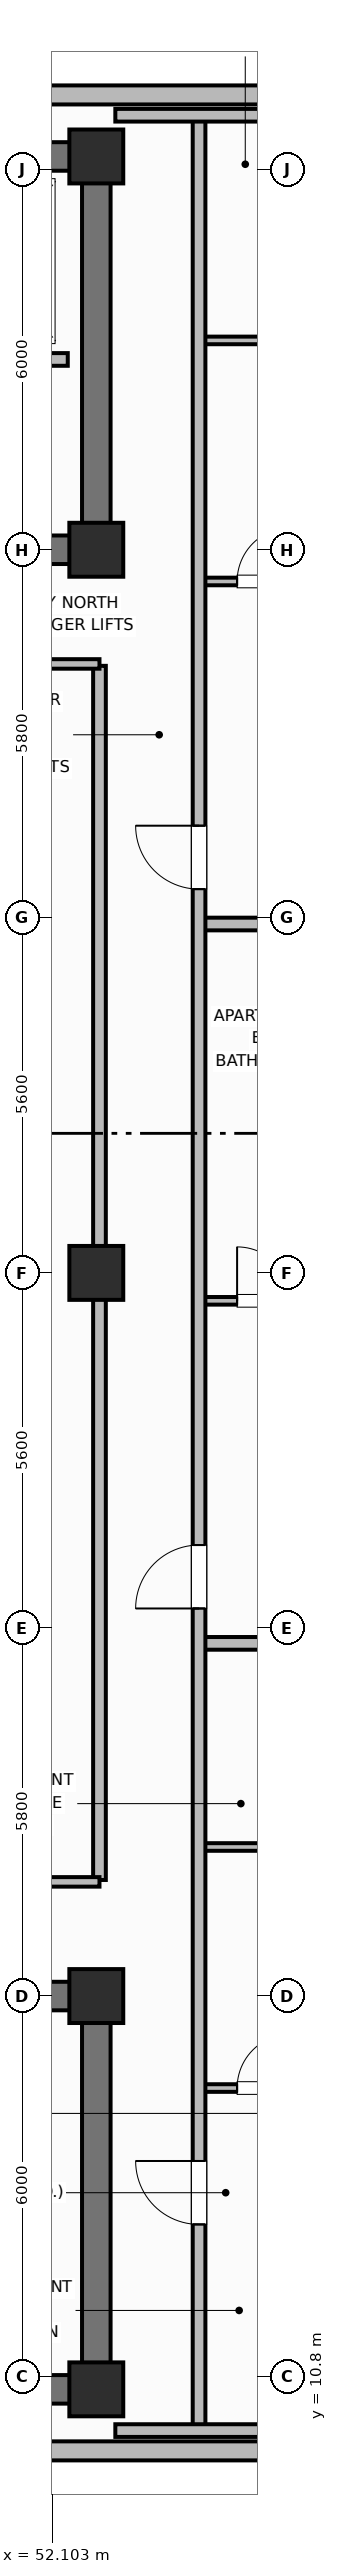
"""IFC4 building model, lengths in metres.
Left out: names, types, materials, properties, quantities, classifications, styles, units other than length and angle.
Written with IfcOpenShell. Run it as: python <this file> out.ifc"""

import sys

from ifc_helpers import new_model, si_unit, direction, frame, frame_2d, origin, origin_2d, place, context, subcontext, project, spatial, rectangle, extrude, element, fill, save


model = new_model("IFC4")
c1 = context("Model", 3, precision=1e-05, world=origin(), true_north=direction((0.0, 1.0)))
c2 = subcontext(c1, "Body", "Model", "MODEL_VIEW")
j1 = project(units=[si_unit("LENGTHUNIT", "METRE"), si_unit("PLANEANGLEUNIT", "RADIAN")], contexts=[c1])
p1 = place(None, origin())
s1 = spatial("IfcSite", under=j1, at=p1, CompositionType="ELEMENT")
p2 = place(p1, origin())
s2 = spatial("IfcBuilding", under=s1, at=p2, CompositionType="ELEMENT")
p3 = place(p2, frame((0.0, 0.0, 233.2)))
s3 = spatial("IfcBuildingStorey", under=s2, at=p3, CompositionType="ELEMENT", Elevation=233.2)
p4 = place(p3, frame((52.8, 10.6, 0.0), z_axis=(0.0, 0.0, 1.0), x_axis=(-1.0, 0.0, 0.0)))
e1 = element("IfcWall", 1, at=p4, inside=s3, PredefinedType="SHEAR", context=c2, shape_type="SweptSolid", body=[
    extrude(rectangle(XDim=27.2, YDim=0.45, at=frame_2d((13.6, 0.0))), origin(), (0.0, 0.0, 1.0), 3.7),
])
p5 = place(p3, frame((52.8, 10.825, 0.0), z_axis=(0.0, 0.0, 1.0), x_axis=(0.0, 1.0, 0.0)))
e2 = element("IfcWall", 2, at=p5, inside=s3, PredefinedType="SHEAR", context=c2, shape_type="SweptSolid", body=[
    extrude(rectangle(XDim=5.75, YDim=0.45, at=frame_2d((2.875, 0.0))), origin(), (0.0, 0.0, 1.0), 3.7),
])
p6 = place(p3, frame((25.6, 16.8, 0.0), z_axis=(0.0, 0.0, 1.0), x_axis=(1.0, 0.0, 0.0)))
e3 = element("IfcWall", 3, at=p6, inside=s3, PredefinedType="SHEAR", context=c2, shape_type="SweptSolid", body=[
    extrude(rectangle(XDim=27.2, YDim=0.45, at=frame_2d((13.6, 0.0))), origin(), (0.0, 0.0, 1.0), 3.7),
])
p7 = place(p6, frame((1.9, 0.0, 0.0)))
e4 = element("IfcOpeningElement", 4, at=p7, cuts=e3, PredefinedType="OPENING", context=c2, shape_type="SweptSolid", body=[
    extrude(rectangle(XDim=1.1, YDim=2.15, at=frame_2d((0.55, 1.075))), frame((0.0, 0.235, 0.0), z_axis=(0.0, -1.0, 0.0), x_axis=(1.0, 0.0, 0.0)), (0.0, 0.0, 1.0), 0.47),
])
p8 = place(p6, frame((13.0, 0.0, 0.0)))
e5 = element("IfcOpeningElement", 5, at=p8, cuts=e3, PredefinedType="OPENING", context=c2, shape_type="SweptSolid", body=[
    extrude(rectangle(XDim=1.2, YDim=2.15, at=frame_2d((0.6, 1.075))), frame((0.0, 0.235, 0.0), z_axis=(0.0, -1.0, 0.0), x_axis=(1.0, 0.0, 0.0)), (0.0, 0.0, 1.0), 0.47),
])
p9 = place(p6, frame((21.6, 0.0, 0.0)))
e6 = element("IfcOpeningElement", 6, at=p9, cuts=e3, PredefinedType="OPENING", context=c2, shape_type="SweptSolid", body=[
    extrude(rectangle(XDim=1.0, YDim=2.15, at=frame_2d((0.5, 1.075))), frame((0.0, 0.235, 0.0), z_axis=(0.0, -1.0, 0.0), x_axis=(1.0, 0.0, 0.0)), (0.0, 0.0, 1.0), 0.47),
])
p10 = place(p3, frame((25.6, 45.8, 0.0), z_axis=(0.0, 0.0, 1.0), x_axis=(1.0, 0.0, 0.0)))
e7 = element("IfcWall", 7, at=p10, inside=s3, PredefinedType="SHEAR", context=c2, shape_type="SweptSolid", body=[
    extrude(rectangle(XDim=27.2, YDim=0.45, at=frame_2d((13.6, 0.0))), origin(), (0.0, 0.0, 1.0), 3.7),
])
p11 = place(p3, frame((52.8, 39.825, 0.0), z_axis=(0.0, 0.0, 1.0), x_axis=(0.0, 1.0, 0.0)))
e8 = element("IfcWall", 8, at=p11, inside=s3, PredefinedType="SHEAR", context=c2, shape_type="SweptSolid", body=[
    extrude(rectangle(XDim=5.75, YDim=0.45, at=frame_2d((2.875, 0.0))), origin(), (0.0, 0.0, 1.0), 3.7),
])
p12 = place(p3, frame((52.8, 39.6, 0.0), z_axis=(0.0, 0.0, 1.0), x_axis=(-1.0, 0.0, 0.0)))
e9 = element("IfcWall", 9, at=p12, inside=s3, PredefinedType="SHEAR", context=c2, shape_type="SweptSolid", body=[
    extrude(rectangle(XDim=27.2, YDim=0.45, at=frame_2d((13.6, 0.0))), origin(), (0.0, 0.0, 1.0), 3.7),
])
p13 = place(p12, frame((24.2, 0.0, 0.0)))
e10 = element("IfcOpeningElement", 10, at=p13, cuts=e9, PredefinedType="OPENING", context=c2, shape_type="SweptSolid", body=[
    extrude(rectangle(XDim=1.1, YDim=2.15, at=frame_2d((0.55, 1.075))), frame((0.0, 0.235, 0.0), z_axis=(0.0, -1.0, 0.0), x_axis=(1.0, 0.0, 0.0)), (0.0, 0.0, 1.0), 0.47),
])
p14 = place(p12, frame((15.1, 0.0, 0.0)))
e11 = element("IfcOpeningElement", 11, at=p14, cuts=e9, PredefinedType="OPENING", context=c2, shape_type="SweptSolid", body=[
    extrude(rectangle(XDim=1.2, YDim=2.15, at=frame_2d((0.6, 1.075))), frame((0.0, 0.235, 0.0), z_axis=(0.0, -1.0, 0.0), x_axis=(1.0, 0.0, 0.0)), (0.0, 0.0, 1.0), 0.47),
])
p15 = place(p12, frame((11.6, 0.0, 0.0)))
e12 = element("IfcOpeningElement", 12, at=p15, cuts=e9, PredefinedType="OPENING", context=c2, shape_type="SweptSolid", body=[
    extrude(rectangle(XDim=0.9, YDim=2.1, at=frame_2d((0.45, 1.05))), frame((0.0, 0.235, 0.0), z_axis=(0.0, -1.0, 0.0), x_axis=(1.0, 0.0, 0.0)), (0.0, 0.0, 1.0), 0.47),
])
p16 = place(p12, frame((7.35, 0.0, 0.0)))
e13 = element("IfcOpeningElement", 13, at=p16, cuts=e9, PredefinedType="OPENING", context=c2, shape_type="SweptSolid", body=[
    extrude(rectangle(XDim=0.85, YDim=2.1, at=frame_2d((0.425, 1.05))), frame((0.0, 0.235, 0.0), z_axis=(0.0, -1.0, 0.0), x_axis=(1.0, 0.0, 0.0)), (0.0, 0.0, 1.0), 0.47),
])
p17 = place(p12, frame((4.2, 0.0, 0.0)))
e14 = element("IfcOpeningElement", 14, at=p17, cuts=e9, PredefinedType="OPENING", context=c2, shape_type="SweptSolid", body=[
    extrude(rectangle(XDim=1.3, YDim=2.2, at=frame_2d((0.65, 1.1))), frame((0.0, 0.235, 0.0), z_axis=(0.0, -1.0, 0.0), x_axis=(1.0, 0.0, 0.0)), (0.0, 0.0, 1.0), 0.47),
])
for number, where, z_axis, x_axis in (
    (15, (52.8, 10.6, 0.0), (0.0, 0.0, 1.0), (1.0, 0.0, 0.0)),
    (16, (52.8, 16.8, 0.0), (0.0, 0.0, 1.0), (1.0, 0.0, 0.0)),
    (17, (52.8, 39.6, 0.0), (0.0, 0.0, 1.0), (1.0, 0.0, 0.0)),
    (18, (52.8, 45.8, 0.0), (0.0, 0.0, 1.0), (1.0, 0.0, 0.0)),
    (19, (52.8, 28.2, 0.0), (0.0, 0.0, 1.0), (1.0, 0.0, 0.0)),
):
    element("IfcColumn", number, at=place(p3, frame(where, z_axis=z_axis, x_axis=x_axis)), inside=s3, PredefinedType="COLUMN", context=c2, shape_type="SweptSolid", body=[
        extrude(rectangle(XDim=0.85, YDim=0.85, at=origin_2d()), origin(), (0.0, 0.0, 1.0), 3.7),
    ])
p18 = place(p3, frame((22.56, 9.63, 0.0), z_axis=(0.0, 0.0, 1.0), x_axis=(1.0, 0.0, 0.0)))
e20 = element("IfcWall", 20, at=p18, inside=s3, PredefinedType="SOLIDWALL", context=c2, shape_type="SweptSolid", body=[
    extrude(rectangle(XDim=33.28, YDim=0.3, at=frame_2d((16.64, 0.0))), origin(), (0.0, 0.0, 1.0), 2.73),
])
p19 = place(p18, frame((4.461, 0.0, 0.95)))
e21 = element("IfcOpeningElement", 21, at=p19, cuts=e20, PredefinedType="OPENING", context=c2, shape_type="SweptSolid", body=[
    extrude(rectangle(XDim=1.1, YDim=1.65, at=frame_2d((0.55, 0.825))), frame((0.0, 0.16, 0.0), z_axis=(0.0, -1.0, 0.0), x_axis=(1.0, 0.0, 0.0)), (0.0, 0.0, 1.0), 0.32),
])
p20 = place(p18, frame((7.368, 0.0, 0.95)))
e22 = element("IfcOpeningElement", 22, at=p20, cuts=e20, PredefinedType="OPENING", context=c2, shape_type="SweptSolid", body=[
    extrude(rectangle(XDim=1.1, YDim=1.65, at=frame_2d((0.55, 0.825))), frame((0.0, 0.16, 0.0), z_axis=(0.0, -1.0, 0.0), x_axis=(1.0, 0.0, 0.0)), (0.0, 0.0, 1.0), 0.32),
])
p21 = place(p18, frame((10.275, 0.0, 0.95)))
e23 = element("IfcOpeningElement", 23, at=p21, cuts=e20, PredefinedType="OPENING", context=c2, shape_type="SweptSolid", body=[
    extrude(rectangle(XDim=1.1, YDim=1.65, at=frame_2d((0.55, 0.825))), frame((0.0, 0.16, 0.0), z_axis=(0.0, -1.0, 0.0), x_axis=(1.0, 0.0, 0.0)), (0.0, 0.0, 1.0), 0.32),
])
p22 = place(p18, frame((13.883, 0.0, 0.95)))
e24 = element("IfcOpeningElement", 24, at=p22, cuts=e20, PredefinedType="OPENING", context=c2, shape_type="SweptSolid", body=[
    extrude(rectangle(XDim=1.1, YDim=1.65, at=frame_2d((0.55, 0.825))), frame((0.0, 0.16, 0.0), z_axis=(0.0, -1.0, 0.0), x_axis=(1.0, 0.0, 0.0)), (0.0, 0.0, 1.0), 0.32),
])
p23 = place(p18, frame((16.09, 0.0, 0.95)))
e25 = element("IfcOpeningElement", 25, at=p23, cuts=e20, PredefinedType="OPENING", context=c2, shape_type="SweptSolid", body=[
    extrude(rectangle(XDim=1.1, YDim=1.65, at=frame_2d((0.55, 0.825))), frame((0.0, 0.16, 0.0), z_axis=(0.0, -1.0, 0.0), x_axis=(1.0, 0.0, 0.0)), (0.0, 0.0, 1.0), 0.32),
])
p24 = place(p18, frame((18.297, 0.0, 0.95)))
e26 = element("IfcOpeningElement", 26, at=p24, cuts=e20, PredefinedType="OPENING", context=c2, shape_type="SweptSolid", body=[
    extrude(rectangle(XDim=1.1, YDim=1.65, at=frame_2d((0.55, 0.825))), frame((0.0, 0.16, 0.0), z_axis=(0.0, -1.0, 0.0), x_axis=(1.0, 0.0, 0.0)), (0.0, 0.0, 1.0), 0.32),
])
p25 = place(p18, frame((21.905, 0.0, 0.95)))
e27 = element("IfcOpeningElement", 27, at=p25, cuts=e20, PredefinedType="OPENING", context=c2, shape_type="SweptSolid", body=[
    extrude(rectangle(XDim=1.1, YDim=1.65, at=frame_2d((0.55, 0.825))), frame((0.0, 0.16, 0.0), z_axis=(0.0, -1.0, 0.0), x_axis=(1.0, 0.0, 0.0)), (0.0, 0.0, 1.0), 0.32),
])
p26 = place(p18, frame((24.812, 0.0, 0.95)))
e28 = element("IfcOpeningElement", 28, at=p26, cuts=e20, PredefinedType="OPENING", context=c2, shape_type="SweptSolid", body=[
    extrude(rectangle(XDim=1.1, YDim=1.65, at=frame_2d((0.55, 0.825))), frame((0.0, 0.16, 0.0), z_axis=(0.0, -1.0, 0.0), x_axis=(1.0, 0.0, 0.0)), (0.0, 0.0, 1.0), 0.32),
])
p27 = place(p18, frame((27.719, 0.0, 0.95)))
e29 = element("IfcOpeningElement", 29, at=p27, cuts=e20, PredefinedType="OPENING", context=c2, shape_type="SweptSolid", body=[
    extrude(rectangle(XDim=1.1, YDim=1.65, at=frame_2d((0.55, 0.825))), frame((0.0, 0.16, 0.0), z_axis=(0.0, -1.0, 0.0), x_axis=(1.0, 0.0, 0.0)), (0.0, 0.0, 1.0), 0.32),
])
p28 = place(p3, frame((55.84, 46.77, 0.0), z_axis=(0.0, 0.0, 1.0), x_axis=(-1.0, 0.0, 0.0)))
e30 = element("IfcWall", 30, at=p28, inside=s3, PredefinedType="SOLIDWALL", context=c2, shape_type="SweptSolid", body=[
    extrude(rectangle(XDim=33.28, YDim=0.3, at=frame_2d((16.64, 0.0))), origin(), (0.0, 0.0, 1.0), 2.73),
])
p29 = place(p28, frame((4.647, 0.0, 0.71)))
e31 = element("IfcOpeningElement", 31, at=p29, cuts=e30, PredefinedType="OPENING", context=c2, shape_type="SweptSolid", body=[
    extrude(rectangle(XDim=1.6, YDim=1.9, at=frame_2d((0.8, 0.95))), frame((0.0, 0.16, 0.0), z_axis=(0.0, -1.0, 0.0), x_axis=(1.0, 0.0, 0.0)), (0.0, 0.0, 1.0), 0.32),
])
p30 = place(p28, frame((7.845, 0.0, 0.71)))
e32 = element("IfcOpeningElement", 32, at=p30, cuts=e30, PredefinedType="OPENING", context=c2, shape_type="SweptSolid", body=[
    extrude(rectangle(XDim=1.6, YDim=1.9, at=frame_2d((0.8, 0.95))), frame((0.0, 0.16, 0.0), z_axis=(0.0, -1.0, 0.0), x_axis=(1.0, 0.0, 0.0)), (0.0, 0.0, 1.0), 0.32),
])
p31 = place(p28, frame((14.241, 0.0, 0.71)))
e33 = element("IfcOpeningElement", 33, at=p31, cuts=e30, PredefinedType="OPENING", context=c2, shape_type="SweptSolid", body=[
    extrude(rectangle(XDim=1.6, YDim=1.9, at=frame_2d((0.8, 0.95))), frame((0.0, 0.16, 0.0), z_axis=(0.0, -1.0, 0.0), x_axis=(1.0, 0.0, 0.0)), (0.0, 0.0, 1.0), 0.32),
])
p32 = place(p28, frame((17.439, 0.0, 0.71)))
e34 = element("IfcOpeningElement", 34, at=p32, cuts=e30, PredefinedType="OPENING", context=c2, shape_type="SweptSolid", body=[
    extrude(rectangle(XDim=1.6, YDim=1.9, at=frame_2d((0.8, 0.95))), frame((0.0, 0.16, 0.0), z_axis=(0.0, -1.0, 0.0), x_axis=(1.0, 0.0, 0.0)), (0.0, 0.0, 1.0), 0.32),
])
p33 = place(p28, frame((23.835, 0.0, 0.71)))
e35 = element("IfcOpeningElement", 35, at=p33, cuts=e30, PredefinedType="OPENING", context=c2, shape_type="SweptSolid", body=[
    extrude(rectangle(XDim=1.6, YDim=1.9, at=frame_2d((0.8, 0.95))), frame((0.0, 0.16, 0.0), z_axis=(0.0, -1.0, 0.0), x_axis=(1.0, 0.0, 0.0)), (0.0, 0.0, 1.0), 0.32),
])
p34 = place(p28, frame((27.033, 0.0, 0.71)))
e36 = element("IfcOpeningElement", 36, at=p34, cuts=e30, PredefinedType="OPENING", context=c2, shape_type="SweptSolid", body=[
    extrude(rectangle(XDim=1.6, YDim=1.9, at=frame_2d((0.8, 0.95))), frame((0.0, 0.16, 0.0), z_axis=(0.0, -1.0, 0.0), x_axis=(1.0, 0.0, 0.0)), (0.0, 0.0, 1.0), 0.32),
])
p35 = place(p3, frame((52.35, 42.6, 0.0), z_axis=(0.0, 0.0, 1.0), x_axis=(-1.0, 0.0, 0.0)))
e37 = element("IfcWall", 37, at=p35, inside=s3, PredefinedType="PARTITIONING", context=c2, shape_type="SweptSolid", body=[
    extrude(rectangle(XDim=6.5, YDim=0.2, at=frame_2d((3.25, 0.0))), origin(), (0.0, 0.0, 1.0), 2.56),
])
p36 = place(p35, frame((4.9, 0.0, 0.0)))
e38 = element("IfcOpeningElement", 38, at=p36, cuts=e37, PredefinedType="OPENING", context=c2, shape_type="SweptSolid", body=[
    extrude(rectangle(XDim=1.0, YDim=2.15, at=frame_2d((0.5, 1.075))), frame((0.0, 0.11, 0.0), z_axis=(0.0, -1.0, 0.0), x_axis=(1.0, 0.0, 0.0)), (0.0, 0.0, 1.0), 0.22),
])
p37 = place(p35, frame((2.8, 0.0, 0.0)))
e39 = element("IfcOpeningElement", 39, at=p37, cuts=e37, PredefinedType="OPENING", context=c2, shape_type="SweptSolid", body=[
    extrude(rectangle(XDim=1.0, YDim=2.15, at=frame_2d((0.5, 1.075))), frame((0.0, 0.11, 0.0), z_axis=(0.0, -1.0, 0.0), x_axis=(1.0, 0.0, 0.0)), (0.0, 0.0, 1.0), 0.22),
])
p38 = place(p35, frame((0.7, 0.0, 0.0)))
e40 = element("IfcOpeningElement", 40, at=p38, cuts=e37, PredefinedType="OPENING", context=c2, shape_type="SweptSolid", body=[
    extrude(rectangle(XDim=1.0, YDim=2.15, at=frame_2d((0.5, 1.075))), frame((0.0, 0.11, 0.0), z_axis=(0.0, -1.0, 0.0), x_axis=(1.0, 0.0, 0.0)), (0.0, 0.0, 1.0), 0.22),
])
p39 = place(p3, frame((52.85, 18.63, 0.0), z_axis=(0.0, 0.0, 1.0), x_axis=(0.0, 1.0, 0.0)))
e41 = element("IfcWall", 41, at=p39, inside=s3, PredefinedType="PARTITIONING", context=c2, shape_type="SweptSolid", body=[
    extrude(rectangle(XDim=19.14, YDim=0.2, at=frame_2d((9.57, 0.0))), origin(), (0.0, 0.0, 1.0), 2.56),
])
for number, where, z_axis, x_axis in (
    (42, (30.7, 18.6, 0.0), (0.0, 0.0, 1.0), (1.0, 0.0, 0.0)),
    (43, (30.7, 37.8, 0.0), (0.0, 0.0, 1.0), (1.0, 0.0, 0.0)),
):
    element("IfcWall", number, at=place(p3, frame(where, z_axis=z_axis, x_axis=x_axis)), inside=s3, PredefinedType="PARTITIONING", context=c2, shape_type="SweptSolid", body=[
        extrude(rectangle(XDim=22.15, YDim=0.15, at=frame_2d((11.075, 0.0))), origin(), (0.0, 0.0, 1.0), 2.56),
    ])
p40 = place(p3, frame((54.42, 15.35, 0.0), z_axis=(0.0, 0.0, 1.0), x_axis=(1.0, 0.0, 0.0)))
e44 = element("IfcWall", 44, at=p40, inside=s3, PredefinedType="PARTITIONING", context=c2, shape_type="SweptSolid", body=[
    extrude(rectangle(XDim=1.95, YDim=0.12, at=frame_2d((0.975, 0.0))), origin(), (0.0, 0.0, 1.0), 2.56),
])
p41 = place(p40, frame((0.6, 0.0, 0.0)))
e45 = element("IfcOpeningElement", 45, at=p41, cuts=e44, PredefinedType="OPENING", context=c2, shape_type="SweptSolid", body=[
    extrude(rectangle(XDim=0.85, YDim=2.1, at=frame_2d((0.425, 1.05))), frame((0.0, 0.07, 0.0), z_axis=(0.0, -1.0, 0.0), x_axis=(1.0, 0.0, 0.0)), (0.0, 0.0, 1.0), 0.14),
])
p42 = place(p3, frame((54.42, 19.15, 0.0), z_axis=(0.0, 0.0, 1.0), x_axis=(1.0, 0.0, 0.0)))
e46 = element("IfcWall", 46, at=p42, inside=s3, PredefinedType="PARTITIONING", context=c2, shape_type="SweptSolid", body=[
    extrude(rectangle(XDim=1.95, YDim=0.12, at=frame_2d((0.975, 0.0))), origin(), (0.0, 0.0, 1.0), 2.56),
])
p43 = place(p3, frame((54.42, 22.36, 0.0), z_axis=(0.0, 0.0, 1.0), x_axis=(1.0, 0.0, 0.0)))
e47 = element("IfcWall", 47, at=p43, inside=s3, PredefinedType="PARTITIONING", context=c2, shape_type="SweptSolid", body=[
    extrude(rectangle(XDim=4.45, YDim=0.2, at=frame_2d((2.225, 0.0))), origin(), (0.0, 0.0, 1.0), 2.56),
])
p44 = place(p3, frame((54.42, 27.76, 0.0), z_axis=(0.0, 0.0, 1.0), x_axis=(1.0, 0.0, 0.0)))
e48 = element("IfcWall", 48, at=p44, inside=s3, PredefinedType="PARTITIONING", context=c2, shape_type="SweptSolid", body=[
    extrude(rectangle(XDim=1.95, YDim=0.12, at=frame_2d((0.975, 0.0))), origin(), (0.0, 0.0, 1.0), 2.56),
])
p45 = place(p44, frame((0.6, 0.0, 0.0)))
e49 = element("IfcOpeningElement", 49, at=p45, cuts=e48, PredefinedType="OPENING", context=c2, shape_type="SweptSolid", body=[
    extrude(rectangle(XDim=0.85, YDim=2.1, at=frame_2d((0.425, 1.05))), frame((0.0, 0.07, 0.0), z_axis=(0.0, -1.0, 0.0), x_axis=(1.0, 0.0, 0.0)), (0.0, 0.0, 1.0), 0.14),
])
p46 = place(p3, frame((54.42, 33.7, 0.0), z_axis=(0.0, 0.0, 1.0), x_axis=(1.0, 0.0, 0.0)))
e50 = element("IfcWall", 50, at=p46, inside=s3, PredefinedType="PARTITIONING", context=c2, shape_type="SweptSolid", body=[
    extrude(rectangle(XDim=4.45, YDim=0.2, at=frame_2d((2.225, 0.0))), origin(), (0.0, 0.0, 1.0), 2.56),
])
p47 = place(p3, frame((54.42, 39.1, 0.0), z_axis=(0.0, 0.0, 1.0), x_axis=(1.0, 0.0, 0.0)))
e51 = element("IfcWall", 51, at=p47, inside=s3, PredefinedType="PARTITIONING", context=c2, shape_type="SweptSolid", body=[
    extrude(rectangle(XDim=1.95, YDim=0.12, at=frame_2d((0.975, 0.0))), origin(), (0.0, 0.0, 1.0), 2.56),
])
p48 = place(p47, frame((0.6, 0.0, 0.0)))
e52 = element("IfcOpeningElement", 52, at=p48, cuts=e51, PredefinedType="OPENING", context=c2, shape_type="SweptSolid", body=[
    extrude(rectangle(XDim=0.85, YDim=2.1, at=frame_2d((0.425, 1.05))), frame((0.0, 0.07, 0.0), z_axis=(0.0, -1.0, 0.0), x_axis=(1.0, 0.0, 0.0)), (0.0, 0.0, 1.0), 0.14),
])
p49 = place(p3, frame((54.42, 42.9, 0.0), z_axis=(0.0, 0.0, 1.0), x_axis=(1.0, 0.0, 0.0)))
e53 = element("IfcWall", 53, at=p49, inside=s3, PredefinedType="PARTITIONING", context=c2, shape_type="SweptSolid", body=[
    extrude(rectangle(XDim=1.95, YDim=0.12, at=frame_2d((0.975, 0.0))), origin(), (0.0, 0.0, 1.0), 2.56),
])
p50 = place(p3, frame((54.42, 9.95, 0.0), z_axis=(0.0, 0.0, 1.0), x_axis=(0.0, 1.0, 0.0)))
e54 = element("IfcWall", 54, at=p50, inside=s3, PredefinedType="PARTITIONING", context=c2, shape_type="SweptSolid", body=[
    extrude(rectangle(XDim=36.5, YDim=0.2, at=frame_2d((18.25, 0.0))), origin(), (0.0, 0.0, 1.0), 2.56),
])
p51 = place(p50, frame((3.25, 0.0, 0.0)))
e55 = element("IfcOpeningElement", 55, at=p51, cuts=e54, PredefinedType="OPENING", context=c2, shape_type="SweptSolid", body=[
    extrude(rectangle(XDim=1.0, YDim=2.15, at=frame_2d((0.5, 1.075))), frame((0.0, 0.11, 0.0), z_axis=(0.0, -1.0, 0.0), x_axis=(1.0, 0.0, 0.0)), (0.0, 0.0, 1.0), 0.22),
])
p52 = place(p50, frame((12.96, 0.0, 0.0)))
e56 = element("IfcOpeningElement", 56, at=p52, cuts=e54, PredefinedType="OPENING", context=c2, shape_type="SweptSolid", body=[
    extrude(rectangle(XDim=1.0, YDim=2.15, at=frame_2d((0.5, 1.075))), frame((0.0, 0.11, 0.0), z_axis=(0.0, -1.0, 0.0), x_axis=(1.0, 0.0, 0.0)), (0.0, 0.0, 1.0), 0.22),
])
p53 = place(p50, frame((24.3, 0.0, 0.0)))
e57 = element("IfcOpeningElement", 57, at=p53, cuts=e54, PredefinedType="OPENING", context=c2, shape_type="SweptSolid", body=[
    extrude(rectangle(XDim=1.0, YDim=2.15, at=frame_2d((0.5, 1.075))), frame((0.0, 0.11, 0.0), z_axis=(0.0, -1.0, 0.0), x_axis=(1.0, 0.0, 0.0)), (0.0, 0.0, 1.0), 0.22),
])
for number, where, z_axis, x_axis in (
    (58, (53.1, 9.95, 0.0), (0.0, 0.0, 1.0), (1.0, 0.0, 0.0)),
    (59, (53.1, 46.45, 0.0), (0.0, 0.0, 1.0), (1.0, 0.0, 0.0)),
):
    element("IfcWall", number, at=place(p3, frame(where, z_axis=z_axis, x_axis=x_axis)), inside=s3, PredefinedType="PARTITIONING", context=c2, shape_type="SweptSolid", body=[
        extrude(rectangle(XDim=3.754, YDim=0.2, at=frame_2d((1.877, 0.0))), origin(), (0.0, 0.0, 1.0), 2.56),
    ])
p54 = place(p41, origin())
e60 = element("IfcDoor", 60, at=p54, inside=s3, OperationType="SINGLE_SWING_RIGHT", PredefinedType="DOOR", context=c2, shape_type="SweptSolid", body=[
    extrude(rectangle(XDim=0.85, YDim=2.1, at=frame_2d((0.425, 1.05))), frame((0.0, 0.025, 0.0), z_axis=(0.0, -1.0, 0.0), x_axis=(1.0, 0.0, 0.0)), (0.0, 0.0, 1.0), 0.05),
])
fill(e45, e60)
p55 = place(p45, origin())
e61 = element("IfcDoor", 61, at=p55, inside=s3, OperationType="SINGLE_SWING_LEFT", PredefinedType="DOOR", context=c2, shape_type="SweptSolid", body=[
    extrude(rectangle(XDim=0.85, YDim=2.1, at=frame_2d((0.425, 1.05))), frame((0.0, 0.025, 0.0), z_axis=(0.0, -1.0, 0.0), x_axis=(1.0, 0.0, 0.0)), (0.0, 0.0, 1.0), 0.05),
])
fill(e49, e61)
p56 = place(p48, origin())
e62 = element("IfcDoor", 62, at=p56, inside=s3, OperationType="SINGLE_SWING_RIGHT", PredefinedType="DOOR", context=c2, shape_type="SweptSolid", body=[
    extrude(rectangle(XDim=0.85, YDim=2.1, at=frame_2d((0.425, 1.05))), frame((0.0, 0.025, 0.0), z_axis=(0.0, -1.0, 0.0), x_axis=(1.0, 0.0, 0.0)), (0.0, 0.0, 1.0), 0.05),
])
fill(e52, e62)
p57 = place(p51, origin())
e63 = element("IfcDoor", 63, at=p57, inside=s3, OperationType="SINGLE_SWING_RIGHT", PredefinedType="DOOR", context=c2, shape_type="SweptSolid", body=[
    extrude(rectangle(XDim=1.0, YDim=2.15, at=frame_2d((0.5, 1.075))), frame((0.0, 0.025, 0.0), z_axis=(0.0, -1.0, 0.0), x_axis=(1.0, 0.0, 0.0)), (0.0, 0.0, 1.0), 0.05),
])
fill(e55, e63)
p58 = place(p52, origin())
e64 = element("IfcDoor", 64, at=p58, inside=s3, OperationType="SINGLE_SWING_LEFT", PredefinedType="DOOR", context=c2, shape_type="SweptSolid", body=[
    extrude(rectangle(XDim=1.0, YDim=2.15, at=frame_2d((0.5, 1.075))), frame((0.0, 0.025, 0.0), z_axis=(0.0, -1.0, 0.0), x_axis=(1.0, 0.0, 0.0)), (0.0, 0.0, 1.0), 0.05),
])
fill(e56, e64)
p59 = place(p53, origin())
e65 = element("IfcDoor", 65, at=p59, inside=s3, OperationType="SINGLE_SWING_RIGHT", PredefinedType="DOOR", context=c2, shape_type="SweptSolid", body=[
    extrude(rectangle(XDim=1.0, YDim=2.15, at=frame_2d((0.5, 1.075))), frame((0.0, 0.025, 0.0), z_axis=(0.0, -1.0, 0.0), x_axis=(1.0, 0.0, 0.0)), (0.0, 0.0, 1.0), 0.05),
])
fill(e57, e65)
save(model, sys.argv[1])
